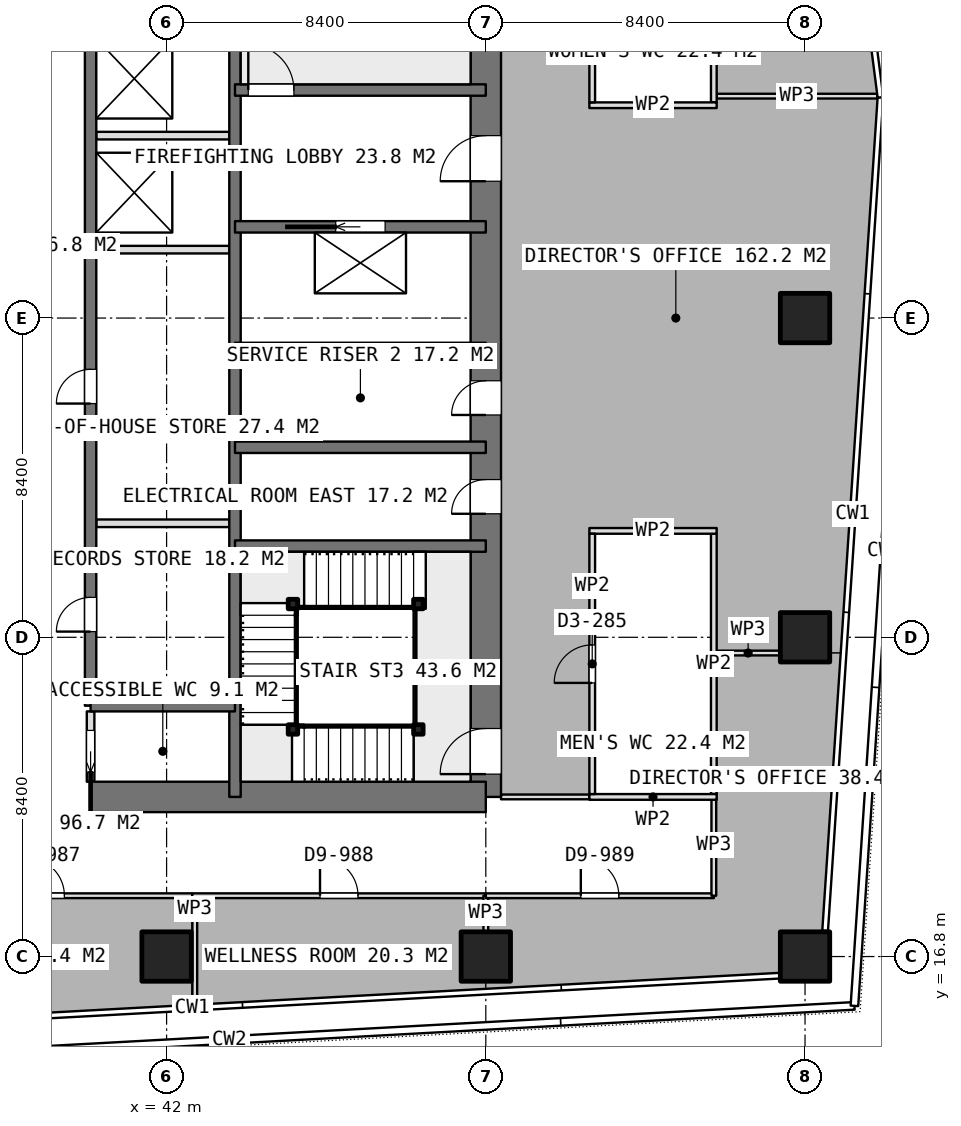
"""IFC4 building model, lengths in metres.
Left out: names, types, materials, properties, quantities, classifications, styles, units other than length and angle.
Written with IfcOpenShell. Run it as: python <this file> out.ifc"""

import sys

from ifc_helpers import new_model, si_unit, direction, frame, frame_2d, origin, origin_2d, place, context, subcontext, project, spatial, rectangle, extrude, element, fill, save


model = new_model("IFC4")
c1 = context("Model", 3, precision=1e-05, world=origin(), true_north=direction((0.0, 1.0)))
c2 = subcontext(c1, "Body", "Model", "MODEL_VIEW")
j1 = project(units=[si_unit("LENGTHUNIT", "METRE"), si_unit("PLANEANGLEUNIT", "RADIAN")], contexts=[c1])
p1 = place(None, origin())
s1 = spatial("IfcSite", under=j1, at=p1, CompositionType="ELEMENT")
p2 = place(p1, origin())
s2 = spatial("IfcBuilding", under=s1, at=p2, CompositionType="ELEMENT")
p3 = place(p2, frame((0.0, 0.0, 265.1)))
s3 = spatial("IfcBuildingStorey", under=s2, at=p3, CompositionType="ELEMENT", Elevation=265.1)
p4 = place(p3, frame((40.0, 21.0, 0.0), z_axis=(0.0, 0.0, 1.0), x_axis=(1.0, 0.0, 0.0)))
e1 = element("IfcWall", 1, at=p4, inside=s3, PredefinedType="SHEAR", context=c2, shape_type="SweptSolid", body=[
    extrude(rectangle(XDim=10.4, YDim=0.8, at=frame_2d((5.2, 0.0))), origin(), (0.0, 0.0, 1.0), 3.75),
])
p5 = place(p3, frame((50.4, 21.0, 0.0), z_axis=(0.0, 0.0, 1.0), x_axis=(0.0, 1.0, 0.0)))
e2 = element("IfcWall", 2, at=p5, inside=s3, PredefinedType="SHEAR", context=c2, shape_type="SweptSolid", body=[
    extrude(rectangle(XDim=25.2, YDim=0.8, at=frame_2d((12.6, 0.0))), origin(), (0.0, 0.0, 1.0), 3.75),
])
p6 = place(p5, frame((16.2, 0.0, 0.0)))
e3 = element("IfcOpeningElement", 3, at=p6, cuts=e2, PredefinedType="OPENING", context=c2, shape_type="SweptSolid", body=[
    extrude(rectangle(XDim=1.2, YDim=2.1, at=frame_2d((0.6, 1.05))), frame((0.0, 0.41, 0.0), z_axis=(0.0, -1.0, 0.0), x_axis=(1.0, 0.0, 0.0)), (0.0, 0.0, 1.0), 0.82),
])
p7 = place(p5, frame((10.05, 0.0, 0.0)))
e4 = element("IfcOpeningElement", 4, at=p7, cuts=e2, PredefinedType="OPENING", context=c2, shape_type="SweptSolid", body=[
    extrude(rectangle(XDim=0.9, YDim=2.1, at=frame_2d((0.45, 1.05))), frame((0.0, 0.41, 0.0), z_axis=(0.0, -1.0, 0.0), x_axis=(1.0, 0.0, 0.0)), (0.0, 0.0, 1.0), 0.82),
])
p8 = place(p5, frame((7.45, 0.0, 0.0)))
e5 = element("IfcOpeningElement", 5, at=p8, cuts=e2, PredefinedType="OPENING", context=c2, shape_type="SweptSolid", body=[
    extrude(rectangle(XDim=0.9, YDim=2.1, at=frame_2d((0.45, 1.05))), frame((0.0, 0.41, 0.0), z_axis=(0.0, -1.0, 0.0), x_axis=(1.0, 0.0, 0.0)), (0.0, 0.0, 1.0), 0.82),
])
p9 = place(p5, frame((0.6, 0.0, 0.0)))
e6 = element("IfcOpeningElement", 6, at=p9, cuts=e2, PredefinedType="OPENING", context=c2, shape_type="SweptSolid", body=[
    extrude(rectangle(XDim=1.2, YDim=2.1, at=frame_2d((0.6, 1.05))), frame((0.0, 0.41, 0.0), z_axis=(0.0, -1.0, 0.0), x_axis=(1.0, 0.0, 0.0)), (0.0, 0.0, 1.0), 0.82),
])
p10 = place(p3, frame((43.8, 21.0, 0.0), z_axis=(0.0, 0.0, 1.0), x_axis=(0.0, 1.0, 0.0)))
e7 = element("IfcWall", 7, at=p10, inside=s3, PredefinedType="SHEAR", context=c2, shape_type="SweptSolid", body=[
    extrude(rectangle(XDim=25.2, YDim=0.3, at=frame_2d((12.6, 0.0))), origin(), (0.0, 0.0, 1.0), 3.75),
])
p11 = place(p3, frame((40.0, 23.4, 0.0), z_axis=(0.0, 0.0, 1.0), x_axis=(0.0, 1.0, 0.0)))
e8 = element("IfcWall", 8, at=p11, inside=s3, PredefinedType="SHEAR", context=c2, shape_type="SweptSolid", body=[
    extrude(rectangle(XDim=18.0, YDim=0.3, at=frame_2d((9.0, 0.0))), origin(), (0.0, 0.0, 1.0), 3.75),
])
p12 = place(p11, frame((1.95, 0.0, 0.0)))
e9 = element("IfcOpeningElement", 9, at=p12, cuts=e8, PredefinedType="OPENING", context=c2, shape_type="SweptSolid", body=[
    extrude(rectangle(XDim=0.9, YDim=2.1, at=frame_2d((0.45, 1.05))), frame((0.0, 0.16, 0.0), z_axis=(0.0, -1.0, 0.0), x_axis=(1.0, 0.0, 0.0)), (0.0, 0.0, 1.0), 0.32),
])
p13 = place(p11, frame((7.95, 0.0, 0.0)))
e10 = element("IfcOpeningElement", 10, at=p13, cuts=e8, PredefinedType="OPENING", context=c2, shape_type="SweptSolid", body=[
    extrude(rectangle(XDim=0.9, YDim=2.1, at=frame_2d((0.45, 1.05))), frame((0.0, 0.16, 0.0), z_axis=(0.0, -1.0, 0.0), x_axis=(1.0, 0.0, 0.0)), (0.0, 0.0, 1.0), 0.32),
])
p14 = place(p3, frame((40.0, 23.4, 0.0), z_axis=(0.0, 0.0, 1.0), x_axis=(1.0, 0.0, 0.0)))
e11 = element("IfcWall", 11, at=p14, inside=s3, PredefinedType="SHEAR", context=c2, shape_type="SweptSolid", body=[
    extrude(rectangle(XDim=3.8, YDim=0.3, at=frame_2d((1.9, 0.0))), origin(), (0.0, 0.0, 1.0), 3.75),
])
for number, where, z_axis, x_axis in (
    (12, (43.8, 27.6, 0.0), (0.0, 0.0, 1.0), (1.0, 0.0, 0.0)),
    (13, (43.8, 30.2, 0.0), (0.0, 0.0, 1.0), (1.0, 0.0, 0.0)),
    (14, (43.8, 32.8, 0.0), (0.0, 0.0, 1.0), (1.0, 0.0, 0.0)),
):
    element("IfcWall", number, at=place(p3, frame(where, z_axis=z_axis, x_axis=x_axis)), inside=s3, PredefinedType="SHEAR", context=c2, shape_type="SweptSolid", body=[
        extrude(rectangle(XDim=6.6, YDim=0.3, at=frame_2d((3.3, 0.0))), origin(), (0.0, 0.0, 1.0), 3.75),
    ])
p15 = place(p3, frame((43.8, 36.0, 0.0), z_axis=(0.0, 0.0, 1.0), x_axis=(1.0, 0.0, 0.0)))
e15 = element("IfcWall", 15, at=p15, inside=s3, PredefinedType="SHEAR", context=c2, shape_type="SweptSolid", body=[
    extrude(rectangle(XDim=6.6, YDim=0.3, at=frame_2d((3.3, 0.0))), origin(), (0.0, 0.0, 1.0), 3.75),
])
p16 = place(p15, frame((2.65, 0.0, 0.0)))
e16 = element("IfcOpeningElement", 16, at=p16, cuts=e15, PredefinedType="OPENING", context=c2, shape_type="SweptSolid", body=[
    extrude(rectangle(XDim=1.3, YDim=2.1, at=frame_2d((0.65, 1.05))), frame((0.0, 0.16, 0.0), z_axis=(0.0, -1.0, 0.0), x_axis=(1.0, 0.0, 0.0)), (0.0, 0.0, 1.0), 0.32),
])
p17 = place(p3, frame((43.8, 39.6, 0.0), z_axis=(0.0, 0.0, 1.0), x_axis=(1.0, 0.0, 0.0)))
e17 = element("IfcWall", 17, at=p17, inside=s3, PredefinedType="SHEAR", context=c2, shape_type="SweptSolid", body=[
    extrude(rectangle(XDim=6.6, YDim=0.3, at=frame_2d((3.3, 0.0))), origin(), (0.0, 0.0, 1.0), 3.75),
])
p18 = place(p17, frame((0.35, 0.0, 0.0)))
e18 = element("IfcOpeningElement", 18, at=p18, cuts=e17, PredefinedType="OPENING", context=c2, shape_type="SweptSolid", body=[
    extrude(rectangle(XDim=1.2, YDim=2.1, at=frame_2d((0.6, 1.05))), frame((0.0, 0.16, 0.0), z_axis=(0.0, -1.0, 0.0), x_axis=(1.0, 0.0, 0.0)), (0.0, 0.0, 1.0), 0.32),
])
for number, where, z_axis, x_axis in (
    (19, (42.0, 16.8, 0.0), (0.0, 0.0, 1.0), (1.0, 0.0, 0.0)),
    (20, (50.4, 16.8, 0.0), (0.0, 0.0, 1.0), (1.0, 0.0, 0.0)),
    (21, (58.8, 16.8, 0.0), (0.0, 0.0, 1.0), (1.0, 0.0, 0.0)),
    (22, (58.8, 25.2, 0.0), (0.0, 0.0, 1.0), (1.0, 0.0, 0.0)),
    (23, (58.8, 33.6, 0.0), (0.0, 0.0, 1.0), (1.0, 0.0, 0.0)),
):
    element("IfcColumn", number, at=place(p3, frame(where, z_axis=z_axis, x_axis=x_axis)), inside=s3, PredefinedType="COLUMN", context=c2, shape_type="SweptSolid", body=[
        extrude(rectangle(XDim=1.3, YDim=1.3, at=origin_2d()), origin(), (0.0, 0.0, 1.0), 3.75),
    ])
for number, where, z_axis, x_axis in (
    (24, (40.15, 35.4, 0.0), (0.0, 0.0, 1.0), (1.0, 0.0, 0.0)),
    (25, (40.15, 38.4, 0.0), (0.0, 0.0, 1.0), (1.0, 0.0, 0.0)),
):
    element("IfcWall", number, at=place(p3, frame(where, z_axis=z_axis, x_axis=x_axis)), inside=s3, PredefinedType="PARTITIONING", context=c2, shape_type="SweptSolid", body=[
        extrude(rectangle(XDim=3.5, YDim=0.2, at=frame_2d((1.75, 0.0))), origin(), (0.0, 0.0, 1.0), 3.5),
    ])
p19 = place(p3, frame((40.0, 21.4, 0.0), z_axis=(0.0, 0.0, 1.0), x_axis=(0.0, 1.0, 0.0)))
e26 = element("IfcWall", 26, at=p19, inside=s3, PredefinedType="PARTITIONING", context=c2, shape_type="SweptSolid", body=[
    extrude(rectangle(XDim=1.85, YDim=0.2, at=frame_2d((0.925, 0.0))), origin(), (0.0, 0.0, 1.0), 3.5),
])
p20 = place(p19, frame((0.25, 0.0, 0.0)))
e27 = element("IfcOpeningElement", 27, at=p20, cuts=e26, PredefinedType="OPENING", context=c2, shape_type="SweptSolid", body=[
    extrude(rectangle(XDim=1.1, YDim=2.1, at=frame_2d((0.55, 1.05))), frame((0.0, 0.11, 0.0), z_axis=(0.0, -1.0, 0.0), x_axis=(1.0, 0.0, 0.0)), (0.0, 0.0, 1.0), 0.22),
])
p21 = place(p3, frame((40.15, 28.2, 0.0), z_axis=(0.0, 0.0, 1.0), x_axis=(1.0, 0.0, 0.0)))
e28 = element("IfcWall", 28, at=p21, inside=s3, PredefinedType="PARTITIONING", context=c2, shape_type="SweptSolid", body=[
    extrude(rectangle(XDim=3.5, YDim=0.2, at=frame_2d((1.75, 0.0))), origin(), (0.0, 0.0, 1.0), 3.5),
])
p22 = place(p3, frame((53.125, 39.2, 0.0), z_axis=(0.0, 0.0, 1.0), x_axis=(1.0, 0.0, 0.0)))
e29 = element("IfcWall", 29, at=p22, inside=s3, PredefinedType="PARTITIONING", context=c2, shape_type="SweptSolid", body=[
    extrude(rectangle(XDim=3.35, YDim=0.15, at=frame_2d((1.675, 0.0))), origin(), (0.0, 0.0, 1.0), 3.5),
])
p23 = place(p3, frame((53.2, 39.275, 0.0), z_axis=(0.0, 0.0, 1.0), x_axis=(0.0, 1.0, 0.0)))
e30 = element("IfcWall", 30, at=p23, inside=s3, PredefinedType="PARTITIONING", context=c2, shape_type="SweptSolid", body=[
    extrude(rectangle(XDim=6.85, YDim=0.15, at=frame_2d((3.425, 0.0))), origin(), (0.0, 0.0, 1.0), 3.5),
])
p24 = place(p23, frame((2.925, 0.0, 0.0)))
e31 = element("IfcOpeningElement", 31, at=p24, cuts=e30, PredefinedType="OPENING", context=c2, shape_type="SweptSolid", body=[
    extrude(rectangle(XDim=1.0, YDim=2.1, at=frame_2d((0.5, 1.05))), frame((0.0, 0.085, 0.0), z_axis=(0.0, -1.0, 0.0), x_axis=(1.0, 0.0, 0.0)), (0.0, 0.0, 1.0), 0.17),
])
p25 = place(p3, frame((56.4, 39.275, 0.0), z_axis=(0.0, 0.0, 1.0), x_axis=(0.0, 1.0, 0.0)))
e32 = element("IfcWall", 32, at=p25, inside=s3, PredefinedType="PARTITIONING", context=c2, shape_type="SweptSolid", body=[
    extrude(rectangle(XDim=6.85, YDim=0.15, at=frame_2d((3.425, 0.0))), origin(), (0.0, 0.0, 1.0), 3.5),
])
for number, where, z_axis, x_axis in (
    (33, (53.125, 21.0, 0.0), (0.0, 0.0, 1.0), (1.0, 0.0, 0.0)),
    (34, (53.125, 28.0, 0.0), (0.0, 0.0, 1.0), (1.0, 0.0, 0.0)),
):
    element("IfcWall", number, at=place(p3, frame(where, z_axis=z_axis, x_axis=x_axis)), inside=s3, PredefinedType="PARTITIONING", context=c2, shape_type="SweptSolid", body=[
        extrude(rectangle(XDim=3.35, YDim=0.15, at=frame_2d((1.675, 0.0))), origin(), (0.0, 0.0, 1.0), 3.5),
    ])
p26 = place(p3, frame((53.2, 21.075, 0.0), z_axis=(0.0, 0.0, 1.0), x_axis=(0.0, 1.0, 0.0)))
e35 = element("IfcWall", 35, at=p26, inside=s3, PredefinedType="PARTITIONING", context=c2, shape_type="SweptSolid", body=[
    extrude(rectangle(XDim=6.85, YDim=0.15, at=frame_2d((3.425, 0.0))), origin(), (0.0, 0.0, 1.0), 3.5),
])
p27 = place(p26, frame((2.925, 0.0, 0.0)))
e36 = element("IfcOpeningElement", 36, at=p27, cuts=e35, PredefinedType="OPENING", context=c2, shape_type="SweptSolid", body=[
    extrude(rectangle(XDim=1.0, YDim=2.1, at=frame_2d((0.5, 1.05))), frame((0.0, 0.085, 0.0), z_axis=(0.0, -1.0, 0.0), x_axis=(1.0, 0.0, 0.0)), (0.0, 0.0, 1.0), 0.17),
])
p28 = place(p3, frame((56.4, 21.075, 0.0), z_axis=(0.0, 0.0, 1.0), x_axis=(0.0, 1.0, 0.0)))
e37 = element("IfcWall", 37, at=p28, inside=s3, PredefinedType="PARTITIONING", context=c2, shape_type="SweptSolid", body=[
    extrude(rectangle(XDim=6.85, YDim=0.15, at=frame_2d((3.425, 0.0))), origin(), (0.0, 0.0, 1.0), 3.5),
])
p29 = place(p3, frame((53.124, 21.0, 0.0), z_axis=(0.0, 0.0, 1.0), x_axis=(-1.0, 0.0, 0.0)))
e38 = element("IfcWall", 38, at=p29, inside=s3, PredefinedType="PARTITIONING", context=c2, shape_type="SweptSolid", body=[
    extrude(rectangle(XDim=2.324, YDim=0.125, at=frame_2d((1.162, 0.0))), origin(), (0.0, 0.0, 1.0), 3.5),
])
p30 = place(p3, frame((56.475, 39.439, 0.0), z_axis=(0.0, 0.0, 1.0), x_axis=(1.0, 0.0, 0.0)))
e39 = element("IfcWall", 39, at=p30, inside=s3, PredefinedType="PARTITIONING", context=c2, shape_type="SweptSolid", body=[
    extrude(rectangle(XDim=4.225, YDim=0.125, at=frame_2d((2.112, 0.0))), origin(), (0.0, 0.0, 1.0), 3.5),
])
p31 = place(p3, frame((34.948, 18.4, 0.0), z_axis=(0.0, 0.0, 1.0), x_axis=(1.0, 0.0, 0.0)))
e40 = element("IfcWall", 40, at=p31, inside=s3, PredefinedType="PARTITIONING", context=c2, shape_type="SweptSolid", body=[
    extrude(rectangle(XDim=7.725, YDim=0.125, at=frame_2d((3.863, 0.0))), origin(), (0.0, 0.0, 1.0), 3.5),
])
p32 = place(p31, frame((3.363, 0.0, 0.0)))
e41 = element("IfcOpeningElement", 41, at=p32, cuts=e40, PredefinedType="OPENING", context=c2, shape_type="SweptSolid", body=[
    extrude(rectangle(XDim=1.0, YDim=2.1, at=frame_2d((0.5, 1.05))), frame((0.0, 0.073, 0.0), z_axis=(0.0, -1.0, 0.0), x_axis=(1.0, 0.0, 0.0)), (0.0, 0.0, 1.0), 0.145),
])
p33 = place(p3, frame((42.742, 18.337, 0.0), z_axis=(0.0, 0.0, 1.0), x_axis=(0.0, -1.0, 0.0)))
e42 = element("IfcWall", 42, at=p33, inside=s3, PredefinedType="PARTITIONING", context=c2, shape_type="SweptSolid", body=[
    extrude(rectangle(XDim=2.799, YDim=0.125, at=frame_2d((1.399, 0.0))), origin(), (0.0, 0.0, 1.0), 3.5),
])
p34 = place(p3, frame((42.674, 18.4, 0.0), z_axis=(0.0, 0.0, 1.0), x_axis=(1.0, 0.0, 0.0)))
e43 = element("IfcWall", 43, at=p34, inside=s3, PredefinedType="PARTITIONING", context=c2, shape_type="SweptSolid", body=[
    extrude(rectangle(XDim=7.726, YDim=0.125, at=frame_2d((3.863, 0.0))), origin(), (0.0, 0.0, 1.0), 3.5),
])
p35 = place(p34, frame((3.363, 0.0, 0.0)))
e44 = element("IfcOpeningElement", 44, at=p35, cuts=e43, PredefinedType="OPENING", context=c2, shape_type="SweptSolid", body=[
    extrude(rectangle(XDim=1.0, YDim=2.1, at=frame_2d((0.5, 1.05))), frame((0.0, 0.073, 0.0), z_axis=(0.0, -1.0, 0.0), x_axis=(1.0, 0.0, 0.0)), (0.0, 0.0, 1.0), 0.145),
])
p36 = place(p3, frame((50.4, 18.4, 0.0), z_axis=(0.0, 0.0, 1.0), x_axis=(0.0, -1.0, 0.0)))
e45 = element("IfcWall", 45, at=p36, inside=s3, PredefinedType="PARTITIONING", context=c2, shape_type="SweptSolid", body=[
    extrude(rectangle(XDim=0.93, YDim=0.125, at=frame_2d((0.465, 0.0))), origin(), (0.0, 0.0, 1.0), 3.5),
])
p37 = place(p3, frame((56.475, 24.786, 0.0), z_axis=(0.0, 0.0, 1.0), x_axis=(1.0, 0.0, 0.0)))
e46 = element("IfcWall", 46, at=p37, inside=s3, PredefinedType="PARTITIONING", context=c2, shape_type="SweptSolid", body=[
    extrude(rectangle(XDim=1.655, YDim=0.125, at=frame_2d((0.827, 0.0))), origin(), (0.0, 0.0, 1.0), 3.5),
])
p38 = place(p3, frame((50.401, 18.4, 0.0), z_axis=(0.0, 0.0, 1.0), x_axis=(1.0, 0.0, 0.0)))
e47 = element("IfcWall", 47, at=p38, inside=s3, PredefinedType="PARTITIONING", context=c2, shape_type="SweptSolid", body=[
    extrude(rectangle(XDim=5.999, YDim=0.125, at=frame_2d((3.0, 0.0))), origin(), (0.0, 0.0, 1.0), 3.5),
])
p39 = place(p38, frame((2.499, 0.0, 0.0)))
e48 = element("IfcOpeningElement", 48, at=p39, cuts=e47, PredefinedType="OPENING", context=c2, shape_type="SweptSolid", body=[
    extrude(rectangle(XDim=1.0, YDim=2.1, at=frame_2d((0.5, 1.05))), frame((0.0, 0.073, 0.0), z_axis=(0.0, -1.0, 0.0), x_axis=(1.0, 0.0, 0.0)), (0.0, 0.0, 1.0), 0.145),
])
p40 = place(p3, frame((56.4, 18.4, 0.0), z_axis=(0.0, 0.0, 1.0), x_axis=(0.0, 1.0, 0.0)))
e49 = element("IfcWall", 49, at=p40, inside=s3, PredefinedType="PARTITIONING", context=c2, shape_type="SweptSolid", body=[
    extrude(rectangle(XDim=2.675, YDim=0.125, at=frame_2d((1.337, 0.0))), origin(), (0.0, 0.0, 1.0), 3.5),
])
for number, where, z_axis, x_axis in (
    (50, (48.625, 22.775, 0.0), (0.0, 0.0, 1.0), (1.0, 0.0, 0.0)),
    (51, (45.325, 22.775, 0.0), (0.0, 0.0, 1.0), (1.0, 0.0, 0.0)),
    (52, (45.325, 26.075, 0.0), (0.0, 0.0, 1.0), (1.0, 0.0, 0.0)),
    (53, (48.625, 26.075, 0.0), (0.0, 0.0, 1.0), (1.0, 0.0, 0.0)),
):
    element("IfcColumn", number, at=place(p3, frame(where, z_axis=z_axis, x_axis=x_axis)), inside=s3, PredefinedType="COLUMN", context=c2, shape_type="SweptSolid", body=[
        extrude(rectangle(XDim=0.25, YDim=0.25, at=origin_2d()), origin(), (0.0, 0.0, 1.0), 3.75),
    ])
p41 = place(p6, origin())
e54 = element("IfcDoor", 54, at=p41, inside=s3, OperationType="SINGLE_SWING_LEFT", PredefinedType="DOOR", context=c2, shape_type="SweptSolid", body=[
    extrude(rectangle(XDim=1.2, YDim=2.1, at=frame_2d((0.6, 1.05))), frame((0.0, 0.025, 0.0), z_axis=(0.0, -1.0, 0.0), x_axis=(1.0, 0.0, 0.0)), (0.0, 0.0, 1.0), 0.05),
])
fill(e3, e54)
p42 = place(p7, origin())
e55 = element("IfcDoor", 55, at=p42, inside=s3, OperationType="SINGLE_SWING_LEFT", PredefinedType="DOOR", context=c2, shape_type="SweptSolid", body=[
    extrude(rectangle(XDim=0.9, YDim=2.1, at=frame_2d((0.45, 1.05))), frame((0.0, 0.025, 0.0), z_axis=(0.0, -1.0, 0.0), x_axis=(1.0, 0.0, 0.0)), (0.0, 0.0, 1.0), 0.05),
])
fill(e4, e55)
p43 = place(p8, origin())
e56 = element("IfcDoor", 56, at=p43, inside=s3, OperationType="SINGLE_SWING_LEFT", PredefinedType="DOOR", context=c2, shape_type="SweptSolid", body=[
    extrude(rectangle(XDim=0.9, YDim=2.1, at=frame_2d((0.45, 1.05))), frame((0.0, 0.025, 0.0), z_axis=(0.0, -1.0, 0.0), x_axis=(1.0, 0.0, 0.0)), (0.0, 0.0, 1.0), 0.05),
])
fill(e5, e56)
p44 = place(p20, origin())
e57 = element("IfcDoor", 57, at=p44, inside=s3, OperationType="SLIDING_TO_LEFT", PredefinedType="DOOR", context=c2, shape_type="SweptSolid", body=[
    extrude(rectangle(XDim=1.1, YDim=2.1, at=frame_2d((0.55, 1.05))), frame((0.0, 0.025, 0.0), z_axis=(0.0, -1.0, 0.0), x_axis=(1.0, 0.0, 0.0)), (0.0, 0.0, 1.0), 0.05),
])
fill(e27, e57)
p45 = place(p12, origin())
e58 = element("IfcDoor", 58, at=p45, inside=s3, OperationType="SINGLE_SWING_LEFT", PredefinedType="DOOR", context=c2, shape_type="SweptSolid", body=[
    extrude(rectangle(XDim=0.9, YDim=2.1, at=frame_2d((0.45, 1.05))), frame((0.0, 0.025, 0.0), z_axis=(0.0, -1.0, 0.0), x_axis=(1.0, 0.0, 0.0)), (0.0, 0.0, 1.0), 0.05),
])
fill(e9, e58)
p46 = place(p13, origin())
e59 = element("IfcDoor", 59, at=p46, inside=s3, OperationType="SINGLE_SWING_LEFT", PredefinedType="DOOR", context=c2, shape_type="SweptSolid", body=[
    extrude(rectangle(XDim=0.9, YDim=2.1, at=frame_2d((0.45, 1.05))), frame((0.0, 0.025, 0.0), z_axis=(0.0, -1.0, 0.0), x_axis=(1.0, 0.0, 0.0)), (0.0, 0.0, 1.0), 0.05),
])
fill(e10, e59)
p47 = place(p16, origin())
e60 = element("IfcDoor", 60, at=p47, inside=s3, OperationType="SLIDING_TO_LEFT", PredefinedType="USERDEFINED", context=c2, shape_type="SweptSolid", body=[
    extrude(rectangle(XDim=1.3, YDim=2.1, at=frame_2d((0.65, 1.05))), frame((0.0, 0.025, 0.0), z_axis=(0.0, -1.0, 0.0), x_axis=(1.0, 0.0, 0.0)), (0.0, 0.0, 1.0), 0.05),
])
fill(e16, e60)
p48 = place(p27, origin())
e61 = element("IfcDoor", 61, at=p48, inside=s3, OperationType="SINGLE_SWING_LEFT", PredefinedType="DOOR", context=c2, shape_type="SweptSolid", body=[
    extrude(rectangle(XDim=1.0, YDim=2.1, at=frame_2d((0.5, 1.05))), frame((0.0, 0.025, 0.0), z_axis=(0.0, -1.0, 0.0), x_axis=(1.0, 0.0, 0.0)), (0.0, 0.0, 1.0), 0.05),
])
fill(e36, e61)
p49 = place(p32, origin())
e62 = element("IfcDoor", 62, at=p49, inside=s3, OperationType="SINGLE_SWING_LEFT", PredefinedType="DOOR", context=c2, shape_type="SweptSolid", body=[
    extrude(rectangle(XDim=1.0, YDim=2.1, at=frame_2d((0.5, 1.05))), frame((0.0, 0.025, 0.0), z_axis=(0.0, -1.0, 0.0), x_axis=(1.0, 0.0, 0.0)), (0.0, 0.0, 1.0), 0.05),
])
fill(e41, e62)
p50 = place(p35, origin())
e63 = element("IfcDoor", 63, at=p50, inside=s3, OperationType="SINGLE_SWING_LEFT", PredefinedType="DOOR", context=c2, shape_type="SweptSolid", body=[
    extrude(rectangle(XDim=1.0, YDim=2.1, at=frame_2d((0.5, 1.05))), frame((0.0, 0.025, 0.0), z_axis=(0.0, -1.0, 0.0), x_axis=(1.0, 0.0, 0.0)), (0.0, 0.0, 1.0), 0.05),
])
fill(e44, e63)
p51 = place(p39, origin())
e64 = element("IfcDoor", 64, at=p51, inside=s3, OperationType="SINGLE_SWING_LEFT", PredefinedType="DOOR", context=c2, shape_type="SweptSolid", body=[
    extrude(rectangle(XDim=1.0, YDim=2.1, at=frame_2d((0.5, 1.05))), frame((0.0, 0.025, 0.0), z_axis=(0.0, -1.0, 0.0), x_axis=(1.0, 0.0, 0.0)), (0.0, 0.0, 1.0), 0.05),
])
fill(e48, e64)
p52 = place(p18, origin())
e65 = element("IfcDoor", 65, at=p52, inside=s3, OperationType="SINGLE_SWING_RIGHT", PredefinedType="DOOR", context=c2, shape_type="SweptSolid", body=[
    extrude(rectangle(XDim=1.2, YDim=2.1, at=frame_2d((0.6, 1.05))), frame((0.0, 0.025, 0.0), z_axis=(0.0, -1.0, 0.0), x_axis=(1.0, 0.0, 0.0)), (0.0, 0.0, 1.0), 0.05),
])
fill(e18, e65)
p53 = place(p9, origin())
e66 = element("IfcDoor", 66, at=p53, inside=s3, OperationType="SINGLE_SWING_RIGHT", PredefinedType="DOOR", context=c2, shape_type="SweptSolid", body=[
    extrude(rectangle(XDim=1.2, YDim=2.1, at=frame_2d((0.6, 1.05))), frame((0.0, 0.025, 0.0), z_axis=(0.0, -1.0, 0.0), x_axis=(1.0, 0.0, 0.0)), (0.0, 0.0, 1.0), 0.05),
])
fill(e6, e66)
save(model, sys.argv[1])
